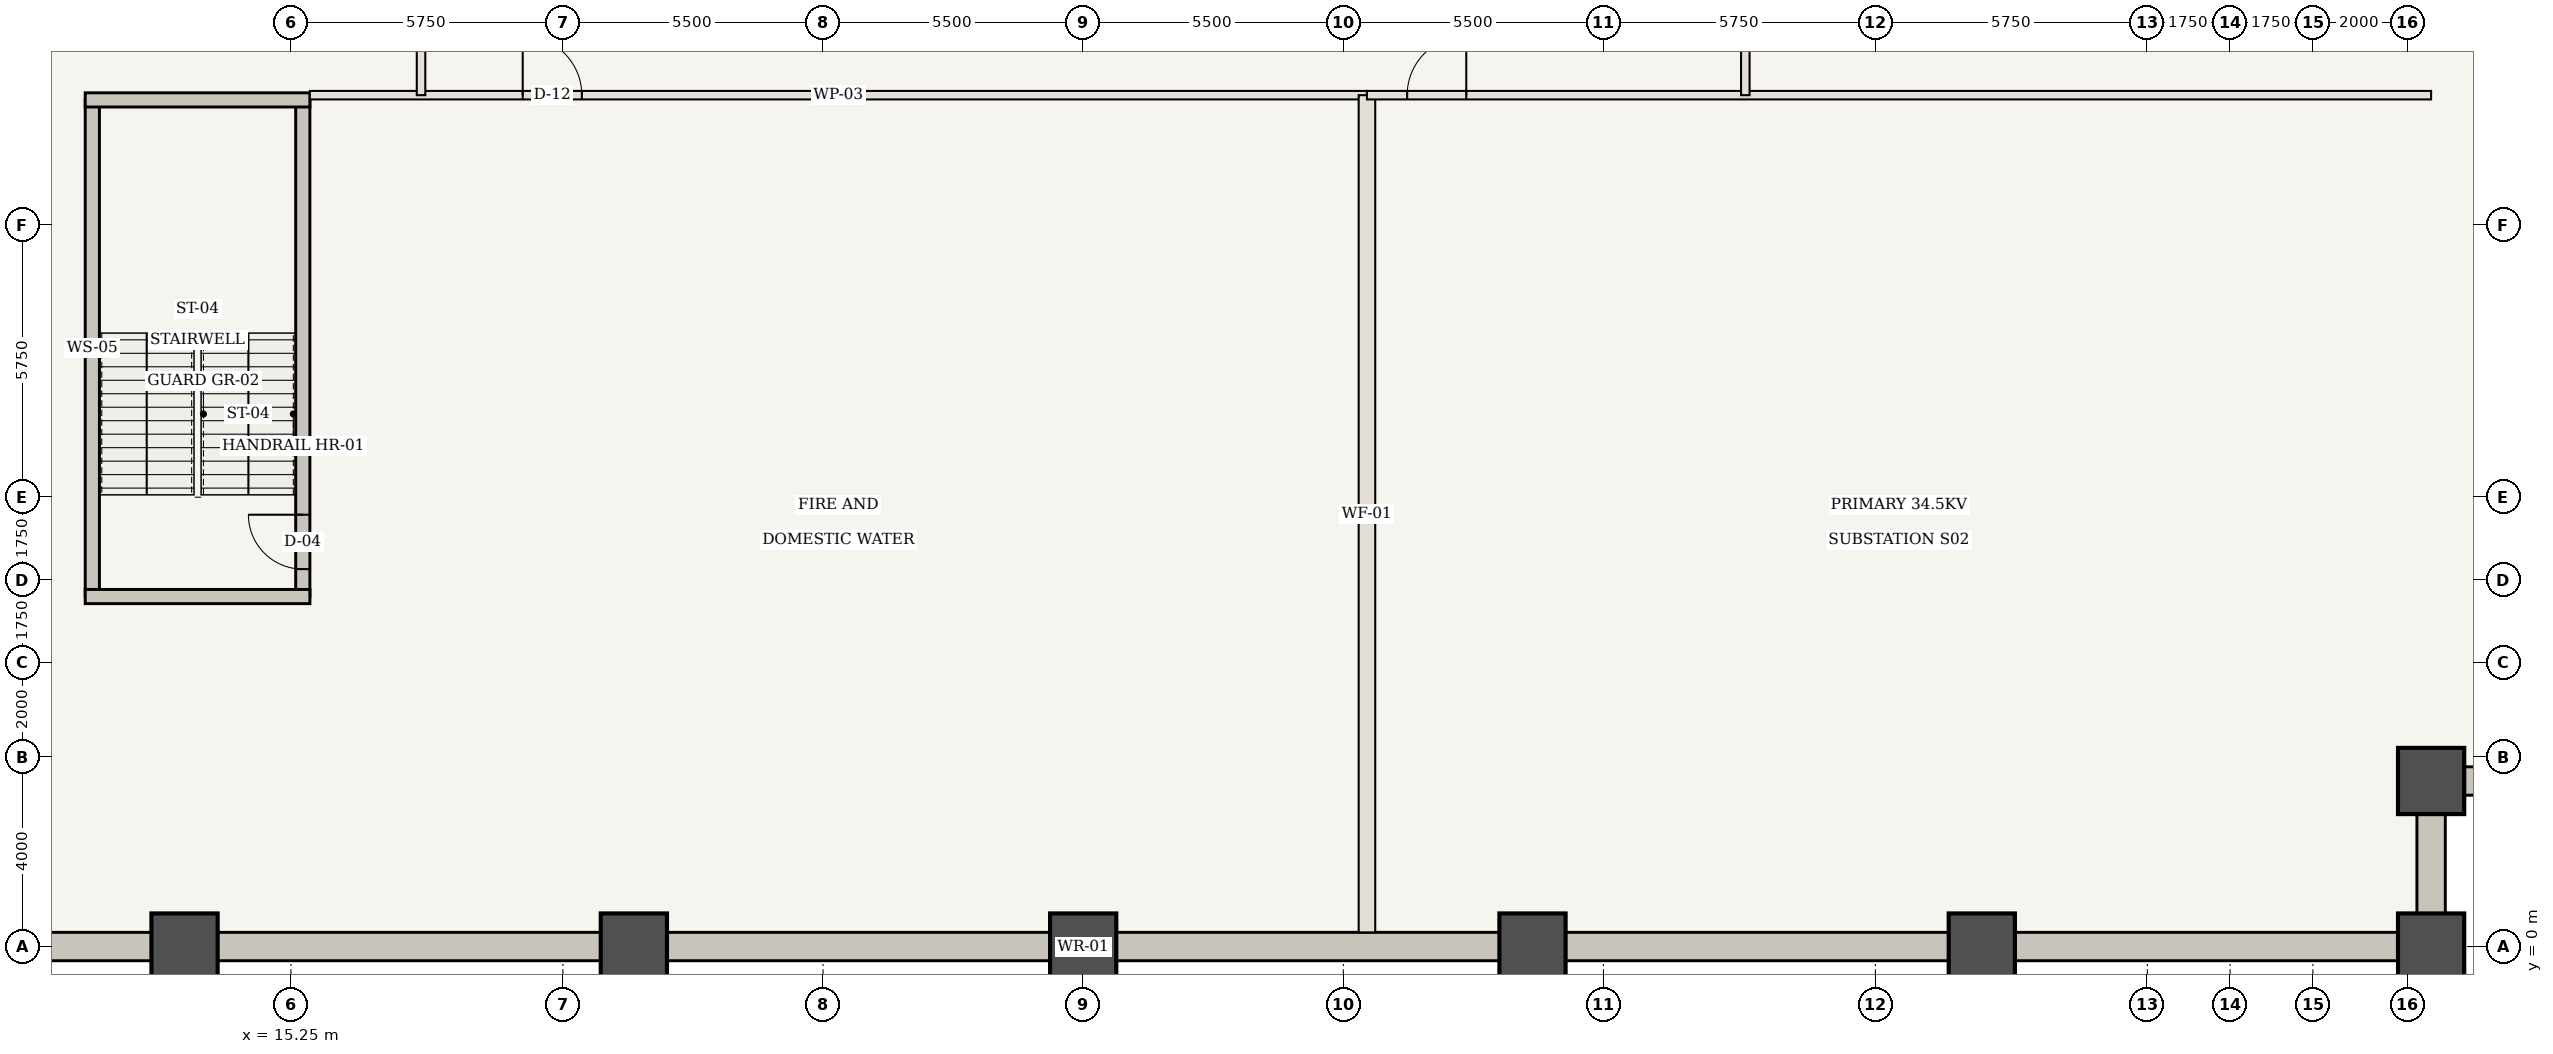
"""IFC4 building model, lengths in metres.
Left out: names, types, materials, properties, quantities, classifications, styles, units other than length and angle.
Written with IfcOpenShell. Run it as: python <this file> out.ifc"""

import sys

from ifc_helpers import new_model, si_unit, direction, frame, frame_2d, origin, origin_2d, place, context, subcontext, project, spatial, rectangle, extrude, element, fill, save


model = new_model("IFC4")
c1 = context("Model", 3, precision=1e-05, world=origin(), true_north=direction((0.0, 1.0)))
c2 = subcontext(c1, "Body", "Model", "MODEL_VIEW")
j1 = project(units=[si_unit("LENGTHUNIT", "METRE"), si_unit("PLANEANGLEUNIT", "RADIAN")], contexts=[c1])
p1 = place(None, origin())
s1 = spatial("IfcSite", under=j1, at=p1, CompositionType="ELEMENT")
p2 = place(p1, origin())
s2 = spatial("IfcBuilding", under=s1, at=p2, CompositionType="ELEMENT")
p3 = place(p2, frame((0.0, 0.0, -9.1)))
s3 = spatial("IfcBuildingStorey", under=s2, at=p3, CompositionType="ELEMENT", Elevation=-9.1)
p4 = place(p3, frame((3.5, 0.0, -0.6), z_axis=(0.0, 0.0, 1.0), x_axis=(1.0, 0.0, 0.0)))
e1 = element("IfcWall", 1, at=p4, inside=s3, PredefinedType="USERDEFINED", context=c2, shape_type="SweptSolid", body=[
    extrude(rectangle(XDim=57.0, YDim=0.6, at=frame_2d((28.5, 0.0))), origin(), (0.0, 0.0, 1.0), 5.15),
])
for number, where, z_axis, x_axis in (
    (2, (60.5, 0.0, -0.6), (0.0, 0.0, 1.0), (0.0, 1.0, 0.0)),
    (3, (60.5, 3.5, -0.6), (0.0, 0.0, 1.0), (1.0, 0.0, 0.0)),
):
    element("IfcWall", number, at=place(p3, frame(where, z_axis=z_axis, x_axis=x_axis)), inside=s3, PredefinedType="USERDEFINED", context=c2, shape_type="SweptSolid", body=[
        extrude(rectangle(XDim=3.5, YDim=0.6, at=frame_2d((1.75, 0.0))), origin(), (0.0, 0.0, 1.0), 5.15),
    ])
for number, where, z_axis, x_axis in (
    (4, (60.5, 0.0, -0.6), (0.0, 0.0, 1.0), (1.0, 0.0, 0.0)),
    (5, (60.5, 3.5, -0.6), (0.0, 0.0, 1.0), (1.0, 0.0, 0.0)),
    (6, (13.0, 0.0, -0.6), (0.0, 0.0, 1.0), (1.0, 0.0, 0.0)),
    (7, (22.5, 0.0, -0.6), (0.0, 0.0, 1.0), (1.0, 0.0, 0.0)),
    (8, (32.0, 0.0, -0.6), (0.0, 0.0, 1.0), (1.0, 0.0, 0.0)),
    (9, (41.5, 0.0, -0.6), (0.0, 0.0, 1.0), (1.0, 0.0, 0.0)),
    (10, (51.0, 0.0, -0.6), (0.0, 0.0, 1.0), (1.0, 0.0, 0.0)),
):
    element("IfcColumn", number, at=place(p3, frame(where, z_axis=z_axis, x_axis=x_axis)), inside=s3, PredefinedType="COLUMN", context=c2, shape_type="SweptSolid", body=[
        extrude(rectangle(XDim=1.4, YDim=1.4, at=origin_2d()), origin(), (0.0, 0.0, 1.0), 5.15),
    ])
p5 = place(p3, frame((11.05, 7.4, 0.0), z_axis=(0.0, 0.0, 1.0), x_axis=(0.0, 1.0, 0.0)))
e11 = element("IfcWall", 11, at=p5, inside=s3, PredefinedType="SHEAR", context=c2, shape_type="SweptSolid", body=[
    extrude(rectangle(XDim=10.5, YDim=0.3, at=frame_2d((5.25, 0.0))), origin(), (0.0, 0.0, 1.0), 4.25),
])
p6 = place(p3, frame((15.5, 7.4, 0.0), z_axis=(0.0, 0.0, 1.0), x_axis=(0.0, 1.0, 0.0)))
e12 = element("IfcWall", 12, at=p6, inside=s3, PredefinedType="SHEAR", context=c2, shape_type="SweptSolid", body=[
    extrude(rectangle(XDim=10.5, YDim=0.3, at=frame_2d((5.25, 0.0))), origin(), (0.0, 0.0, 1.0), 4.25),
])
p7 = place(p6, frame((0.58, 0.0, 0.0)))
e13 = element("IfcOpeningElement", 13, at=p7, cuts=e12, PredefinedType="OPENING", context=c2, shape_type="SweptSolid", body=[
    extrude(rectangle(XDim=1.15, YDim=2.15, at=frame_2d((0.575, 1.075))), frame((0.0, 0.16, 0.0), z_axis=(0.0, -1.0, 0.0), x_axis=(1.0, 0.0, 0.0)), (0.0, 0.0, 1.0), 0.32),
])
for number, where, z_axis, x_axis in (
    (14, (10.9, 7.4, 0.0), (0.0, 0.0, 1.0), (1.0, 0.0, 0.0)),
    (15, (10.9, 17.9, 0.0), (0.0, 0.0, 1.0), (1.0, 0.0, 0.0)),
):
    element("IfcWall", number, at=place(p3, frame(where, z_axis=z_axis, x_axis=x_axis)), inside=s3, PredefinedType="SHEAR", context=c2, shape_type="SweptSolid", body=[
        extrude(rectangle(XDim=4.75, YDim=0.3, at=frame_2d((2.375, 0.0))), origin(), (0.0, 0.0, 1.0), 4.25),
    ])
p8 = place(p3, frame((15.65, 18.0, 0.0), z_axis=(0.0, 0.0, 1.0), x_axis=(1.0, 0.0, 0.0)))
e16 = element("IfcWall", 16, at=p8, inside=s3, PredefinedType="STANDARD", context=c2, shape_type="SweptSolid", body=[
    extrude(rectangle(XDim=22.35, YDim=0.18, at=frame_2d((11.175, 0.0))), origin(), (0.0, 0.0, 1.0), 4.25),
])
p9 = place(p8, frame((4.5, 0.0, 0.0)))
e17 = element("IfcOpeningElement", 17, at=p9, cuts=e16, PredefinedType="OPENING", context=c2, shape_type="SweptSolid", body=[
    extrude(rectangle(XDim=1.25, YDim=2.2, at=frame_2d((0.625, 1.1))), frame((0.0, 0.1, 0.0), z_axis=(0.0, -1.0, 0.0), x_axis=(1.0, 0.0, 0.0)), (0.0, 0.0, 1.0), 0.2),
])
p10 = place(p3, frame((38.0, 0.3, 0.0), z_axis=(0.0, 0.0, 1.0), x_axis=(0.0, 1.0, 0.0)))
e18 = element("IfcWall", 18, at=p10, inside=s3, PredefinedType="STANDARD", context=c2, shape_type="SweptSolid", body=[
    extrude(rectangle(XDim=17.7, YDim=0.35, at=frame_2d((8.85, 0.0))), origin(), (0.0, 0.0, 1.0), 4.25),
])
p11 = place(p3, frame((38.0, 18.0, 0.0), z_axis=(0.0, 0.0, 1.0), x_axis=(1.0, 0.0, 0.0)))
e19 = element("IfcWall", 19, at=p11, inside=s3, PredefinedType="STANDARD", context=c2, shape_type="SweptSolid", body=[
    extrude(rectangle(XDim=22.5, YDim=0.18, at=frame_2d((11.25, 0.0))), origin(), (0.0, 0.0, 1.0), 4.25),
])
p12 = place(p11, frame((0.85, 0.0, 0.0)))
e20 = element("IfcOpeningElement", 20, at=p12, cuts=e19, PredefinedType="OPENING", context=c2, shape_type="SweptSolid", body=[
    extrude(rectangle(XDim=1.25, YDim=2.2, at=frame_2d((0.625, 1.1))), frame((0.0, 0.1, 0.0), z_axis=(0.0, -1.0, 0.0), x_axis=(1.0, 0.0, 0.0)), (0.0, 0.0, 1.0), 0.2),
])
p13 = place(p3, frame((18.0, 18.0, 0.0), z_axis=(0.0, 0.0, 1.0), x_axis=(0.0, 1.0, 0.0)))
e21 = element("IfcWall", 21, at=p13, inside=s3, PredefinedType="STANDARD", context=c2, shape_type="SweptSolid", body=[
    extrude(rectangle(XDim=28.0, YDim=0.18, at=frame_2d((14.0, 0.0))), origin(), (0.0, 0.0, 1.0), 4.25),
])
p14 = place(p13, frame((14.95, 0.0, 0.0)))
e22 = element("IfcOpeningElement", 22, at=p14, cuts=e21, PredefinedType="OPENING", context=c2, shape_type="SweptSolid", body=[
    extrude(rectangle(XDim=1.25, YDim=2.2, at=frame_2d((0.625, 1.1))), frame((0.0, 0.1, 0.0), z_axis=(0.0, -1.0, 0.0), x_axis=(1.0, 0.0, 0.0)), (0.0, 0.0, 1.0), 0.2),
])
p15 = place(p3, frame((46.0, 18.0, 0.0), z_axis=(0.0, 0.0, 1.0), x_axis=(0.0, 1.0, 0.0)))
e23 = element("IfcWall", 23, at=p15, inside=s3, PredefinedType="STANDARD", context=c2, shape_type="SweptSolid", body=[
    extrude(rectangle(XDim=28.0, YDim=0.18, at=frame_2d((14.0, 0.0))), origin(), (0.0, 0.0, 1.0), 4.25),
])
p16 = place(p15, frame((14.95, 0.0, 0.0)))
e24 = element("IfcOpeningElement", 24, at=p16, cuts=e23, PredefinedType="OPENING", context=c2, shape_type="SweptSolid", body=[
    extrude(rectangle(XDim=1.25, YDim=2.2, at=frame_2d((0.625, 1.1))), frame((0.0, 0.1, 0.0), z_axis=(0.0, -1.0, 0.0), x_axis=(1.0, 0.0, 0.0)), (0.0, 0.0, 1.0), 0.2),
])
p17 = place(p7, origin())
e25 = element("IfcDoor", 25, at=p17, inside=s3, OperationType="SINGLE_SWING_RIGHT", PredefinedType="DOOR", context=c2, shape_type="SweptSolid", body=[
    extrude(rectangle(XDim=1.15, YDim=2.15, at=frame_2d((0.575, 1.075))), frame((0.0, 0.025, 0.0), z_axis=(0.0, -1.0, 0.0), x_axis=(1.0, 0.0, 0.0)), (0.0, 0.0, 1.0), 0.05),
])
fill(e13, e25)
p18 = place(p9, origin())
e26 = element("IfcDoor", 26, at=p18, inside=s3, OperationType="SINGLE_SWING_LEFT", PredefinedType="DOOR", context=c2, shape_type="SweptSolid", body=[
    extrude(rectangle(XDim=1.25, YDim=2.2, at=frame_2d((0.625, 1.1))), frame((0.0, 0.025, 0.0), z_axis=(0.0, -1.0, 0.0), x_axis=(1.0, 0.0, 0.0)), (0.0, 0.0, 1.0), 0.05),
])
fill(e17, e26)
p19 = place(p12, origin())
e27 = element("IfcDoor", 27, at=p19, inside=s3, OperationType="SINGLE_SWING_RIGHT", PredefinedType="DOOR", context=c2, shape_type="SweptSolid", body=[
    extrude(rectangle(XDim=1.25, YDim=2.2, at=frame_2d((0.625, 1.1))), frame((0.0, 0.025, 0.0), z_axis=(0.0, -1.0, 0.0), x_axis=(1.0, 0.0, 0.0)), (0.0, 0.0, 1.0), 0.05),
])
fill(e20, e27)
save(model, sys.argv[1])
